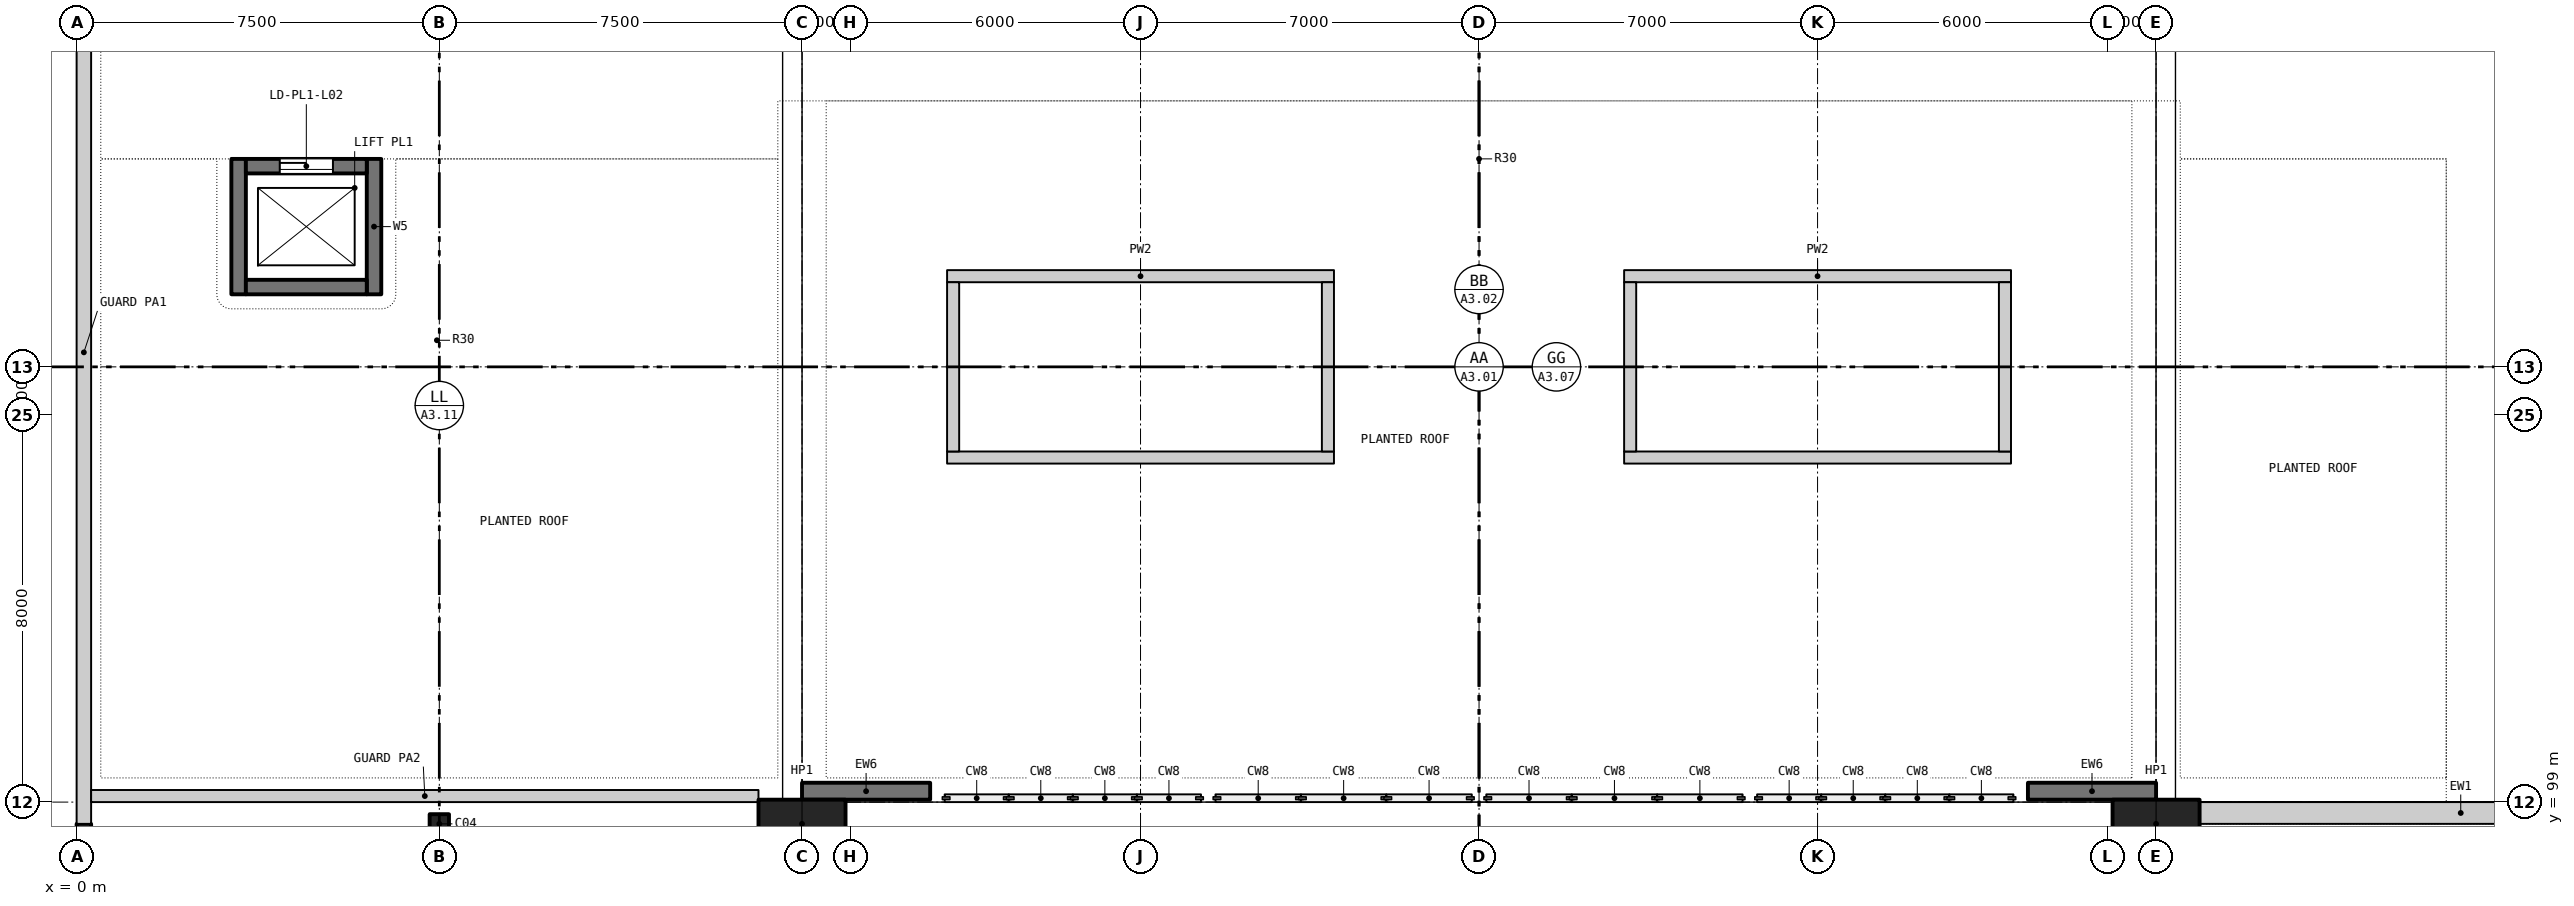
"""IFC4 building model, lengths in metres.
Left out: names, types, materials, properties, quantities, classifications, styles, units other than length and angle.
Written with IfcOpenShell. Run it as: python <this file> out.ifc"""

import sys

from ifc_helpers import new_model, si_unit, direction, frame, frame_2d, origin, origin_2d, place, context, subcontext, project, spatial, polyline, rectangle, outline, extrude, element, fill, save


model = new_model("IFC4")
c1 = context("Model", 3, precision=1e-05, world=origin(), true_north=direction((0.0, 1.0)))
c2 = subcontext(c1, "Body", "Model", "MODEL_VIEW")
j1 = project(units=[si_unit("LENGTHUNIT", "METRE"), si_unit("PLANEANGLEUNIT", "RADIAN")], contexts=[c1])
p1 = place(None, origin())
s1 = spatial("IfcSite", under=j1, at=p1, CompositionType="ELEMENT")
p2 = place(p1, origin())
s2 = spatial("IfcBuilding", under=s1, at=p2, CompositionType="ELEMENT")
p3 = place(p2, frame((0.0, 0.0, 10.2)))
s3 = spatial("IfcBuildingStorey", under=s2, at=p3, CompositionType="ELEMENT", Elevation=10.2)
p4 = place(p3, frame((7.5, 98.55, 0.0), z_axis=(0.0, 0.0, 1.0), x_axis=(1.0, 0.0, 0.0)))
e1 = element("IfcColumn", 1, at=p4, inside=s3, PredefinedType="COLUMN", context=c2, shape_type="SweptSolid", body=[
    extrude(rectangle(XDim=0.4, YDim=0.4, at=origin_2d()), origin(), (0.0, 0.0, 1.0), 1.85),
])
for number, where, z_axis, x_axis in (
    (2, (3.35, 109.5, 0.0), (0.0, 0.0, 1.0), (0.0, 1.0, 0.0)),
    (3, (6.15, 109.5, 0.0), (0.0, 0.0, 1.0), (0.0, 1.0, 0.0)),
):
    element("IfcWall", number, at=place(p3, frame(where, z_axis=z_axis, x_axis=x_axis)), inside=s3, PredefinedType="SHEAR", context=c2, shape_type="SweptSolid", body=[
        extrude(rectangle(XDim=2.8, YDim=0.3, at=frame_2d((1.4, 0.0))), origin(), (0.0, 0.0, 1.0), 3.6),
    ])
p5 = place(p3, frame((3.5, 109.65, 0.0), z_axis=(0.0, 0.0, 1.0), x_axis=(1.0, 0.0, 0.0)))
e4 = element("IfcWall", 4, at=p5, inside=s3, PredefinedType="SHEAR", context=c2, shape_type="SweptSolid", body=[
    extrude(rectangle(XDim=2.5, YDim=0.3, at=frame_2d((1.25, 0.0))), origin(), (0.0, 0.0, 1.0), 3.6),
])
p6 = place(p3, frame((3.5, 112.15, 0.0), z_axis=(0.0, 0.0, 1.0), x_axis=(1.0, 0.0, 0.0)))
e5 = element("IfcWall", 5, at=p6, inside=s3, PredefinedType="SHEAR", context=c2, shape_type="SweptSolid", body=[
    extrude(rectangle(XDim=2.5, YDim=0.3, at=frame_2d((1.25, 0.0))), origin(), (0.0, 0.0, 1.0), 3.6),
])
p7 = place(p6, frame((0.7, 0.0, 0.0)))
e6 = element("IfcOpeningElement", 6, at=p7, cuts=e5, PredefinedType="OPENING", context=c2, shape_type="SweptSolid", body=[
    extrude(rectangle(XDim=1.1, YDim=2.1, at=frame_2d((0.55, 1.05))), frame((0.0, 0.16, 0.0), z_axis=(0.0, -1.0, 0.0), x_axis=(1.0, 0.0, 0.0)), (0.0, 0.0, 1.0), 0.32),
])
p8 = place(p3, frame((0.15, 90.0, 0.0), z_axis=(0.0, 0.0, 1.0), x_axis=(0.0, 1.0, 0.0)))
e7 = element("IfcWall", 7, at=p8, inside=s3, PredefinedType="SHEAR", context=c2, shape_type="SweptSolid", body=[
    extrude(rectangle(XDim=8.55, YDim=0.3, at=frame_2d((4.275, 0.0))), origin(), (0.0, 0.0, 1.0), 2.85),
])
for number, where, z_axis, x_axis in (
    (8, (15.0, 98.55, 0.0), (0.0, 0.0, 1.0), (1.0, 0.0, 0.0)),
    (9, (43.0, 98.55, 0.0), (0.0, 0.0, 1.0), (1.0, 0.0, 0.0)),
):
    element("IfcColumn", number, at=place(p3, frame(where, z_axis=z_axis, x_axis=x_axis)), inside=s3, PredefinedType="COLUMN", context=c2, shape_type="SweptSolid", body=[
        extrude(rectangle(XDim=1.8, YDim=1.0, at=origin_2d()), origin(), (0.0, 0.0, 1.0), 4.2),
    ])
p9 = place(p3, frame((43.9, 98.775, 0.0), z_axis=(0.0, 0.0, 1.0), x_axis=(1.0, 0.0, 0.0)))
e10 = element("IfcWall", 10, at=p9, inside=s3, PredefinedType="SOLIDWALL", context=c2, shape_type="SweptSolid", body=[
    extrude(rectangle(XDim=10.8, YDim=0.45, at=frame_2d((5.4, 0.0))), origin(), (0.0, 0.0, 1.0), 3.9),
])
p10 = place(p9, frame((8.1, 0.0, 0.0)))
e11 = element("IfcOpeningElement", 11, at=p10, cuts=e10, PredefinedType="OPENING", context=c2, shape_type="SweptSolid", body=[
    extrude(rectangle(XDim=1.0, YDim=2.1, at=frame_2d((0.5, 1.05))), frame((0.0, 0.235, 0.0), z_axis=(0.0, -1.0, 0.0), x_axis=(1.0, 0.0, 0.0)), (0.0, 0.0, 1.0), 0.47),
])
p11 = place(p3, frame((0.15, 98.55, 0.0), z_axis=(0.0, 0.0, 1.0), x_axis=(0.0, 1.0, 0.0)))
e12 = element("IfcWall", 12, at=p11, inside=s3, PredefinedType="PARAPET", context=c2, shape_type="SweptSolid", body=[
    extrude(rectangle(XDim=19.5, YDim=0.3, at=frame_2d((9.75, 0.0))), origin(), (0.0, 0.0, 1.0), 1.1),
])
p12 = place(p3, frame((14.1, 99.125, 0.0), z_axis=(0.0, 0.0, 1.0), x_axis=(-1.0, 0.0, 0.0)))
e13 = element("IfcWall", 13, at=p12, inside=s3, PredefinedType="PARAPET", context=c2, shape_type="SweptSolid", body=[
    extrude(rectangle(XDim=13.8, YDim=0.25, at=frame_2d((6.9, 0.0))), origin(), (0.0, 0.0, 1.0), 1.1),
])
for number, where, z_axis, x_axis in (
    (14, (15.0, 99.225, 0.6), (0.0, 0.0, 1.0), (1.0, 0.0, 0.0)),
    (15, (43.0, 99.225, 0.6), (0.0, 0.0, 1.0), (-1.0, 0.0, 0.0)),
):
    element("IfcWall", number, at=place(p3, frame(where, z_axis=z_axis, x_axis=x_axis)), inside=s3, PredefinedType="SOLIDWALL", context=c2, shape_type="SweptSolid", body=[
        extrude(outline(polyline([(0.0, 0.0), (2.65, 0.0), (2.65, 16.237), (2.55, 16.163), (0.23, 12.368), (0.0, 11.133), (0.0, 0.0)])), frame((0.0, 0.175, 0.0), z_axis=(0.0, -1.0, 0.0), x_axis=(1.0, 0.0, 0.0)), (0.0, 0.0, 1.0), 0.35),
    ])
for number, where, z_axis, x_axis in (
    (16, (18.0, 106.125, 0.0), (0.0, 0.0, 1.0), (1.0, 0.0, 0.0)),
    (17, (18.0, 109.875, 0.0), (0.0, 0.0, 1.0), (1.0, 0.0, 0.0)),
):
    element("IfcWall", number, at=place(p3, frame(where, z_axis=z_axis, x_axis=x_axis)), inside=s3, PredefinedType="SOLIDWALL", context=c2, shape_type="SweptSolid", body=[
        extrude(rectangle(XDim=8.0, YDim=0.25, at=frame_2d((4.0, 0.0))), origin(), (0.0, 0.0, 1.0), 0.6),
    ])
for number, where, z_axis, x_axis in (
    (18, (18.125, 106.25, 0.0), (0.0, 0.0, 1.0), (0.0, 1.0, 0.0)),
    (19, (25.875, 106.25, 0.0), (0.0, 0.0, 1.0), (0.0, 1.0, 0.0)),
):
    element("IfcWall", number, at=place(p3, frame(where, z_axis=z_axis, x_axis=x_axis)), inside=s3, PredefinedType="SOLIDWALL", context=c2, shape_type="SweptSolid", body=[
        extrude(rectangle(XDim=3.5, YDim=0.25, at=frame_2d((1.75, 0.0))), origin(), (0.0, 0.0, 1.0), 0.6),
    ])
for number, where, z_axis, x_axis in (
    (20, (32.0, 106.125, 0.0), (0.0, 0.0, 1.0), (1.0, 0.0, 0.0)),
    (21, (32.0, 109.875, 0.0), (0.0, 0.0, 1.0), (1.0, 0.0, 0.0)),
):
    element("IfcWall", number, at=place(p3, frame(where, z_axis=z_axis, x_axis=x_axis)), inside=s3, PredefinedType="SOLIDWALL", context=c2, shape_type="SweptSolid", body=[
        extrude(rectangle(XDim=8.0, YDim=0.25, at=frame_2d((4.0, 0.0))), origin(), (0.0, 0.0, 1.0), 0.6),
    ])
for number, where, z_axis, x_axis in (
    (22, (32.125, 106.25, 0.0), (0.0, 0.0, 1.0), (0.0, 1.0, 0.0)),
    (23, (39.875, 106.25, 0.0), (0.0, 0.0, 1.0), (0.0, 1.0, 0.0)),
):
    element("IfcWall", number, at=place(p3, frame(where, z_axis=z_axis, x_axis=x_axis)), inside=s3, PredefinedType="SOLIDWALL", context=c2, shape_type="SweptSolid", body=[
        extrude(rectangle(XDim=3.5, YDim=0.25, at=frame_2d((1.75, 0.0))), origin(), (0.0, 0.0, 1.0), 0.6),
    ])
p13 = place(p7, origin())
e24 = element("IfcDoor", 24, at=p13, inside=s3, OperationType="SLIDING_TO_LEFT", PredefinedType="DOOR", context=c2, shape_type="SweptSolid", body=[
    extrude(rectangle(XDim=1.1, YDim=2.1, at=frame_2d((0.55, 1.05))), frame((0.0, 0.025, 0.0), z_axis=(0.0, -1.0, 0.0), x_axis=(1.0, 0.0, 0.0)), (0.0, 0.0, 1.0), 0.05),
])
fill(e6, e24)
save(model, sys.argv[1])
